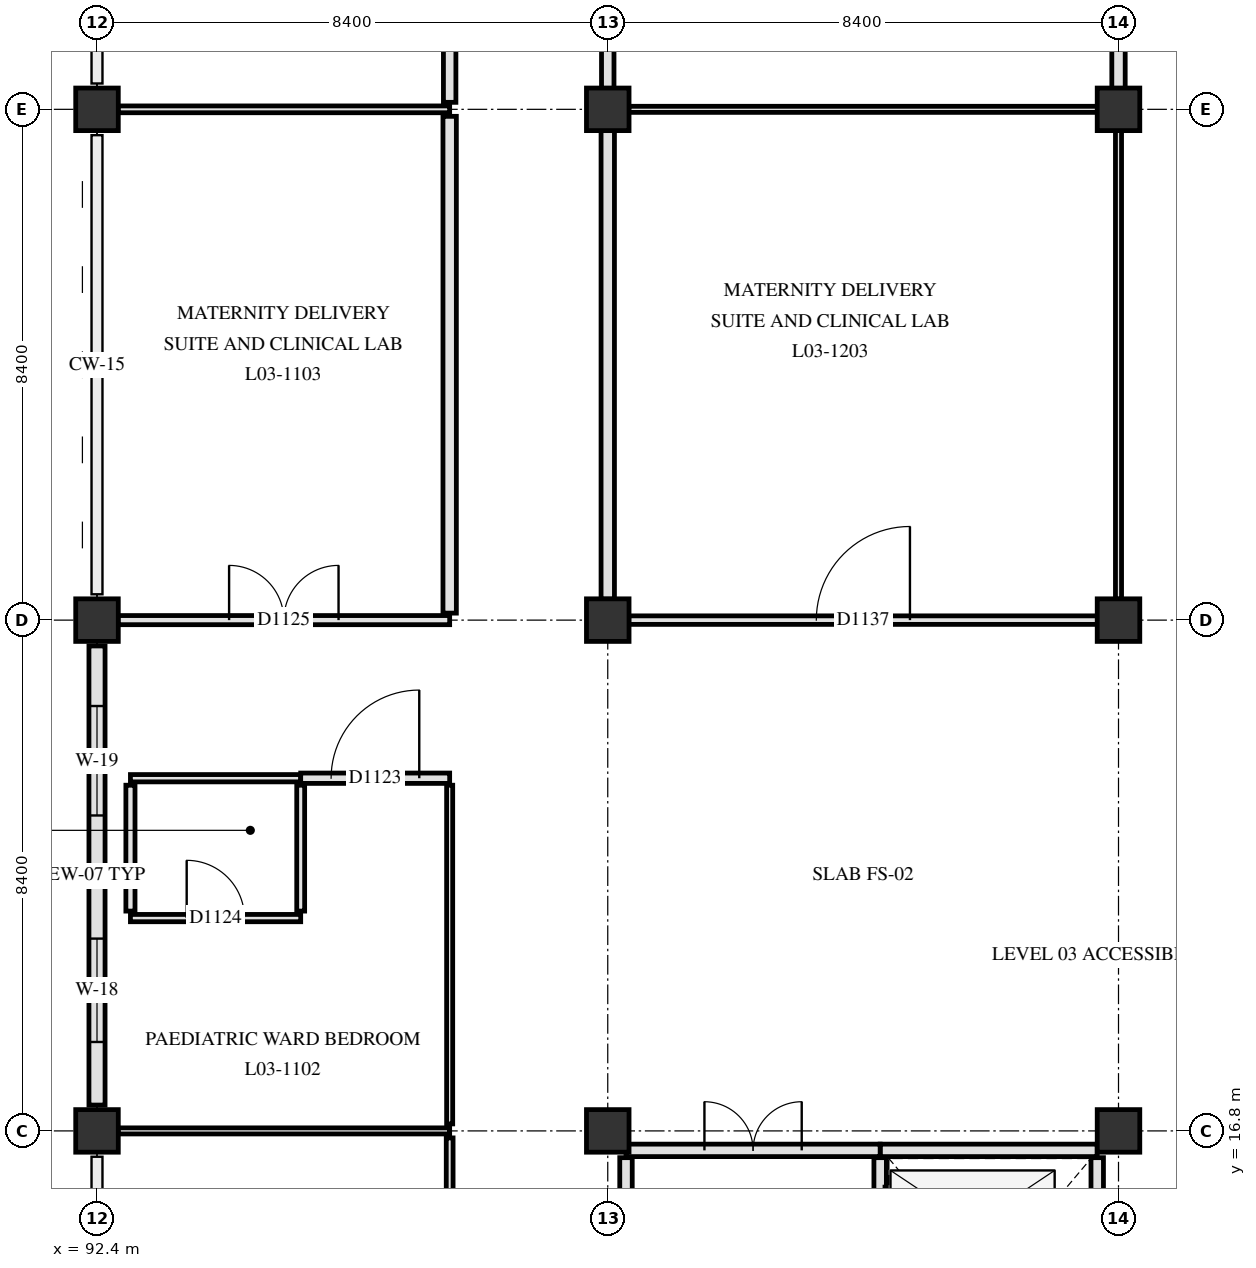
"""IFC4 building model, lengths in metres.
Left out: names, types, materials, properties, quantities, classifications, styles, units other than length and angle.
Written with IfcOpenShell. Run it as: python <this file> out.ifc"""

import sys

from ifc_helpers import new_model, si_unit, direction, frame, frame_2d, origin, origin_2d, place, context, subcontext, project, spatial, rectangle, extrude, element, fill, save


model = new_model("IFC4")
c1 = context("Model", 3, precision=1e-05, world=origin(), true_north=direction((0.0, 1.0)))
c2 = subcontext(c1, "Body", "Model", "MODEL_VIEW")
j1 = project(units=[si_unit("LENGTHUNIT", "METRE"), si_unit("PLANEANGLEUNIT", "RADIAN")], contexts=[c1])
p1 = place(None, origin())
s1 = spatial("IfcSite", under=j1, at=p1, CompositionType="ELEMENT")
p2 = place(p1, origin())
s2 = spatial("IfcBuilding", under=s1, at=p2, CompositionType="ELEMENT")
p3 = place(p2, frame((0.0, 0.0, 14.4)))
s3 = spatial("IfcBuildingStorey", under=s2, at=p3, CompositionType="ELEMENT", Elevation=14.4)
for number, where, z_axis, x_axis in (
    (1, (92.4, 16.8, 0.0), (0.0, 0.0, 1.0), (1.0, 0.0, 0.0)),
    (2, (92.4, 25.2, 0.0), (0.0, 0.0, 1.0), (1.0, 0.0, 0.0)),
    (3, (92.4, 33.6, 0.0), (0.0, 0.0, 1.0), (1.0, 0.0, 0.0)),
    (4, (100.8, 16.8, 0.0), (0.0, 0.0, 1.0), (1.0, 0.0, 0.0)),
    (5, (100.8, 25.2, 0.0), (0.0, 0.0, 1.0), (1.0, 0.0, 0.0)),
    (6, (100.8, 33.6, 0.0), (0.0, 0.0, 1.0), (1.0, 0.0, 0.0)),
    (7, (109.2, 16.8, 0.0), (0.0, 0.0, 1.0), (1.0, 0.0, 0.0)),
    (8, (109.2, 25.2, 0.0), (0.0, 0.0, 1.0), (1.0, 0.0, 0.0)),
    (9, (109.2, 33.6, 0.0), (0.0, 0.0, 1.0), (1.0, 0.0, 0.0)),
):
    element("IfcColumn", number, at=place(p3, frame(where, z_axis=z_axis, x_axis=x_axis)), inside=s3, PredefinedType="COLUMN", context=c2, shape_type="SweptSolid", body=[
        extrude(rectangle(XDim=0.7, YDim=0.7, at=origin_2d()), origin(), (0.0, 0.0, 1.0), 4.2),
    ])
p4 = place(p3, frame((92.4, 17.225, 0.0), z_axis=(0.0, 0.0, 1.0), x_axis=(0.0, 1.0, 0.0)))
e10 = element("IfcWall", 10, at=p4, inside=s3, PredefinedType="SOLIDWALL", context=c2, shape_type="SweptSolid", body=[
    extrude(rectangle(XDim=7.55, YDim=0.265, at=frame_2d((3.775, 0.0))), origin(), (0.0, 0.0, 1.0), 3.19),
])
p5 = place(p4, frame((1.038, 0.0, 0.85)))
e11 = element("IfcOpeningElement", 11, at=p5, cuts=e10, PredefinedType="OPENING", context=c2, shape_type="SweptSolid", body=[
    extrude(rectangle(XDim=1.7, YDim=1.42, at=frame_2d((0.85, 0.71))), frame((0.0, 0.142, 0.0), z_axis=(0.0, -1.0, 0.0), x_axis=(1.0, 0.0, 0.0)), (0.0, 0.0, 1.0), 0.285),
])
p6 = place(p4, frame((4.762, 0.0, 0.85)))
e12 = element("IfcOpeningElement", 12, at=p6, cuts=e10, PredefinedType="OPENING", context=c2, shape_type="SweptSolid", body=[
    extrude(rectangle(XDim=1.8, YDim=1.42, at=frame_2d((0.9, 0.71))), frame((0.0, 0.142, 0.0), z_axis=(0.0, -1.0, 0.0), x_axis=(1.0, 0.0, 0.0)), (0.0, 0.0, 1.0), 0.285),
])
p7 = place(p3, frame((105.28, 12.24, 0.0), z_axis=(0.0, 0.0, 1.0), x_axis=(0.0, 1.0, 0.0)))
e13 = element("IfcWall", 13, at=p7, inside=s3, PredefinedType="PARTITIONING", context=c2, shape_type="SweptSolid", body=[
    extrude(rectangle(XDim=4.12, YDim=0.205, at=frame_2d((2.06, 0.0))), origin(), (0.0, 0.0, 1.0), 3.89),
])
p8 = place(p7, frame((0.445, 0.0, 0.0)))
e14 = element("IfcOpeningElement", 14, at=p8, cuts=e13, PredefinedType="OPENING", context=c2, shape_type="SweptSolid", body=[
    extrude(rectangle(XDim=1.35, YDim=2.2, at=frame_2d((0.675, 1.1))), frame((0.0, 0.113, 0.0), z_axis=(0.0, -1.0, 0.0), x_axis=(1.0, 0.0, 0.0)), (0.0, 0.0, 1.0), 0.225),
])
p9 = place(p7, frame((2.325, 0.0, 0.0)))
e15 = element("IfcOpeningElement", 15, at=p9, cuts=e13, PredefinedType="OPENING", context=c2, shape_type="SweptSolid", body=[
    extrude(rectangle(XDim=1.35, YDim=2.2, at=frame_2d((0.675, 1.1))), frame((0.0, 0.113, 0.0), z_axis=(0.0, -1.0, 0.0), x_axis=(1.0, 0.0, 0.0)), (0.0, 0.0, 1.0), 0.225),
])
p10 = place(p3, frame((108.85, 12.24, 0.0), z_axis=(0.0, 0.0, 1.0), x_axis=(0.0, 1.0, 0.0)))
e16 = element("IfcWall", 16, at=p10, inside=s3, PredefinedType="PARTITIONING", context=c2, shape_type="SweptSolid", body=[
    extrude(rectangle(XDim=4.12, YDim=0.205, at=frame_2d((2.06, 0.0))), origin(), (0.0, 0.0, 1.0), 3.89),
])
p11 = place(p3, frame((105.28, 16.48, 0.0), z_axis=(0.0, 0.0, 1.0), x_axis=(1.0, 0.0, 0.0)))
e17 = element("IfcWall", 17, at=p11, inside=s3, PredefinedType="PARTITIONING", context=c2, shape_type="SweptSolid", body=[
    extrude(rectangle(XDim=3.57, YDim=0.205, at=frame_2d((1.785, 0.0))), origin(), (0.0, 0.0, 1.0), 3.29),
])
p12 = place(p3, frame((101.1, 12.24, 0.0), z_axis=(0.0, 0.0, 1.0), x_axis=(0.0, 1.0, 0.0)))
e18 = element("IfcWall", 18, at=p12, inside=s3, PredefinedType="PARTITIONING", context=c2, shape_type="SweptSolid", body=[
    extrude(rectangle(XDim=4.12, YDim=0.205, at=frame_2d((2.06, 0.0))), origin(), (0.0, 0.0, 1.0), 2.69),
])
p13 = place(p3, frame((101.1, 16.48, 0.0), z_axis=(0.0, 0.0, 1.0), x_axis=(1.0, 0.0, 0.0)))
e19 = element("IfcWall", 19, at=p13, inside=s3, PredefinedType="PARTITIONING", context=c2, shape_type="SweptSolid", body=[
    extrude(rectangle(XDim=4.18, YDim=0.205, at=frame_2d((2.09, 0.0))), origin(), (0.0, 0.0, 1.0), 2.69),
])
p14 = place(p13, frame((1.29, 0.0, 0.0)))
e20 = element("IfcOpeningElement", 20, at=p14, cuts=e19, PredefinedType="OPENING", context=c2, shape_type="SweptSolid", body=[
    extrude(rectangle(XDim=1.6, YDim=2.25, at=frame_2d((0.8, 1.125))), frame((0.0, 0.113, 0.0), z_axis=(0.0, -1.0, 0.0), x_axis=(1.0, 0.0, 0.0)), (0.0, 0.0, 1.0), 0.225),
])
p15 = place(p3, frame((92.745, 16.8, 0.0), z_axis=(0.0, 0.0, 1.0), x_axis=(1.0, 0.0, 0.0)))
e21 = element("IfcWall", 21, at=p15, inside=s3, PredefinedType="PARTITIONING", context=c2, shape_type="SweptSolid", body=[
    extrude(rectangle(XDim=5.455, YDim=0.1, at=frame_2d((2.728, 0.0))), origin(), (0.0, 0.0, 1.0), 3.29),
])
p16 = place(p3, frame((92.95, 20.3, 0.0), z_axis=(0.0, 0.0, 1.0), x_axis=(1.0, 0.0, 0.0)))
e22 = element("IfcWall", 22, at=p16, inside=s3, PredefinedType="PARTITIONING", context=c2, shape_type="SweptSolid", body=[
    extrude(rectangle(XDim=2.8, YDim=0.12, at=frame_2d((1.4, 0.0))), origin(), (0.0, 0.0, 1.0), 3.89),
])
p17 = place(p16, frame((0.925, 0.0, 0.0)))
e23 = element("IfcOpeningElement", 23, at=p17, cuts=e22, PredefinedType="OPENING", context=c2, shape_type="SweptSolid", body=[
    extrude(rectangle(XDim=0.95, YDim=2.1, at=frame_2d((0.475, 1.05))), frame((0.0, 0.07, 0.0), z_axis=(0.0, -1.0, 0.0), x_axis=(1.0, 0.0, 0.0)), (0.0, 0.0, 1.0), 0.14),
])
p18 = place(p3, frame((92.95, 22.6, 0.0), z_axis=(0.0, 0.0, 1.0), x_axis=(1.0, 0.0, 0.0)))
e24 = element("IfcWall", 24, at=p18, inside=s3, PredefinedType="PARTITIONING", context=c2, shape_type="SweptSolid", body=[
    extrude(rectangle(XDim=2.8, YDim=0.12, at=frame_2d((1.4, 0.0))), origin(), (0.0, 0.0, 1.0), 3.89),
])
p19 = place(p3, frame((95.75, 22.6, 0.0), z_axis=(0.0, 0.0, 1.0), x_axis=(1.0, 0.0, 0.0)))
e25 = element("IfcWall", 25, at=p19, inside=s3, PredefinedType="PARTITIONING", context=c2, shape_type="SweptSolid", body=[
    extrude(rectangle(XDim=2.45, YDim=0.17, at=frame_2d((1.225, 0.0))), origin(), (0.0, 0.0, 1.0), 3.89),
])
p20 = place(p19, frame((0.5, 0.0, 0.0)))
e26 = element("IfcOpeningElement", 26, at=p20, cuts=e25, PredefinedType="OPENING", context=c2, shape_type="SweptSolid", body=[
    extrude(rectangle(XDim=1.45, YDim=2.2, at=frame_2d((0.725, 1.1))), frame((0.0, 0.095, 0.0), z_axis=(0.0, -1.0, 0.0), x_axis=(1.0, 0.0, 0.0)), (0.0, 0.0, 1.0), 0.19),
])
p21 = place(p3, frame((92.745, 25.2, 0.0), z_axis=(0.0, 0.0, 1.0), x_axis=(1.0, 0.0, 0.0)))
e27 = element("IfcWall", 27, at=p21, inside=s3, PredefinedType="PARTITIONING", context=c2, shape_type="SweptSolid", body=[
    extrude(rectangle(XDim=5.455, YDim=0.15, at=frame_2d((2.728, 0.0))), origin(), (0.0, 0.0, 1.0), 2.89),
])
p22 = place(p21, frame((1.827, 0.0, 0.0)))
e28 = element("IfcOpeningElement", 28, at=p22, cuts=e27, PredefinedType="OPENING", context=c2, shape_type="SweptSolid", body=[
    extrude(rectangle(XDim=1.8, YDim=2.25, at=frame_2d((0.9, 1.125))), frame((0.0, 0.085, 0.0), z_axis=(0.0, -1.0, 0.0), x_axis=(1.0, 0.0, 0.0)), (0.0, 0.0, 1.0), 0.17),
])
p23 = place(p3, frame((101.145, 25.2, 0.0), z_axis=(0.0, 0.0, 1.0), x_axis=(1.0, 0.0, 0.0)))
e29 = element("IfcWall", 29, at=p23, inside=s3, PredefinedType="PARTITIONING", context=c2, shape_type="SweptSolid", body=[
    extrude(rectangle(XDim=7.71, YDim=0.14, at=frame_2d((3.855, 0.0))), origin(), (0.0, 0.0, 1.0), 2.89),
])
p24 = place(p23, frame((3.085, 0.0, 0.0)))
e30 = element("IfcOpeningElement", 30, at=p24, cuts=e29, PredefinedType="OPENING", context=c2, shape_type="SweptSolid", body=[
    extrude(rectangle(XDim=1.54, YDim=2.24, at=frame_2d((0.77, 1.12))), frame((0.0, 0.08, 0.0), z_axis=(0.0, -1.0, 0.0), x_axis=(1.0, 0.0, 0.0)), (0.0, 0.0, 1.0), 0.16),
])
p25 = place(p3, frame((92.745, 33.6, 0.0), z_axis=(0.0, 0.0, 1.0), x_axis=(1.0, 0.0, 0.0)))
e31 = element("IfcWall", 31, at=p25, inside=s3, PredefinedType="PARTITIONING", context=c2, shape_type="SweptSolid", body=[
    extrude(rectangle(XDim=5.455, YDim=0.112, at=frame_2d((2.728, 0.0))), origin(), (0.0, 0.0, 1.0), 3.29),
])
p26 = place(p3, frame((101.145, 33.6, 0.0), z_axis=(0.0, 0.0, 1.0), x_axis=(1.0, 0.0, 0.0)))
e32 = element("IfcWall", 32, at=p26, inside=s3, PredefinedType="PARTITIONING", context=c2, shape_type="SweptSolid", body=[
    extrude(rectangle(XDim=7.71, YDim=0.1, at=frame_2d((3.855, 0.0))), origin(), (0.0, 0.0, 1.0), 3.29),
])
p27 = place(p3, frame((92.95, 20.415, 0.0), z_axis=(0.0, 0.0, 1.0), x_axis=(0.0, 1.0, 0.0)))
e33 = element("IfcWall", 33, at=p27, inside=s3, PredefinedType="PARTITIONING", context=c2, shape_type="SweptSolid", body=[
    extrude(rectangle(XDim=2.07, YDim=0.15, at=frame_2d((1.035, 0.0))), origin(), (0.0, 0.0, 1.0), 3.89),
])
p28 = place(p3, frame((95.75, 20.415, 0.0), z_axis=(0.0, 0.0, 1.0), x_axis=(0.0, 1.0, 0.0)))
e34 = element("IfcWall", 34, at=p28, inside=s3, PredefinedType="PARTITIONING", context=c2, shape_type="SweptSolid", body=[
    extrude(rectangle(XDim=2.07, YDim=0.13, at=frame_2d((1.035, 0.0))), origin(), (0.0, 0.0, 1.0), 3.89),
])
p29 = place(p3, frame((98.2, 11.115, 0.0), z_axis=(0.0, 0.0, 1.0), x_axis=(0.0, 1.0, 0.0)))
e35 = element("IfcWall", 35, at=p29, inside=s3, PredefinedType="PARTITIONING", context=c2, shape_type="SweptSolid", body=[
    extrude(rectangle(XDim=5.57, YDim=0.112, at=frame_2d((2.785, 0.0))), origin(), (0.0, 0.0, 1.0), 3.29),
])
p30 = place(p3, frame((98.2, 16.915, 0.0), z_axis=(0.0, 0.0, 1.0), x_axis=(0.0, 1.0, 0.0)))
e36 = element("IfcWall", 36, at=p30, inside=s3, PredefinedType="PARTITIONING", context=c2, shape_type="SweptSolid", body=[
    extrude(rectangle(XDim=5.57, YDim=0.1, at=frame_2d((2.785, 0.0))), origin(), (0.0, 0.0, 1.0), 3.29),
])
p31 = place(p3, frame((98.2, 25.315, 0.0), z_axis=(0.0, 0.0, 1.0), x_axis=(0.0, 1.0, 0.0)))
e37 = element("IfcWall", 37, at=p31, inside=s3, PredefinedType="PARTITIONING", context=c2, shape_type="SweptSolid", body=[
    extrude(rectangle(XDim=8.17, YDim=0.22, at=frame_2d((4.085, 0.0))), origin(), (0.0, 0.0, 1.0), 2.89),
])
p32 = place(p3, frame((98.2, 33.715, 0.0), z_axis=(0.0, 0.0, 1.0), x_axis=(0.0, 1.0, 0.0)))
e38 = element("IfcWall", 38, at=p32, inside=s3, PredefinedType="PARTITIONING", context=c2, shape_type="SweptSolid", body=[
    extrude(rectangle(XDim=8.17, YDim=0.205, at=frame_2d((4.085, 0.0))), origin(), (0.0, 0.0, 1.0), 3.29),
])
p33 = place(p3, frame((100.8, 25.545, 0.0), z_axis=(0.0, 0.0, 1.0), x_axis=(0.0, 1.0, 0.0)))
e39 = element("IfcWall", 39, at=p33, inside=s3, PredefinedType="PARTITIONING", context=c2, shape_type="SweptSolid", body=[
    extrude(rectangle(XDim=7.71, YDim=0.22, at=frame_2d((3.855, 0.0))), origin(), (0.0, 0.0, 1.0), 2.69),
])
p34 = place(p3, frame((100.8, 33.945, 0.0), z_axis=(0.0, 0.0, 1.0), x_axis=(0.0, 1.0, 0.0)))
e40 = element("IfcWall", 40, at=p34, inside=s3, PredefinedType="PARTITIONING", context=c2, shape_type="SweptSolid", body=[
    extrude(rectangle(XDim=7.71, YDim=0.205, at=frame_2d((3.855, 0.0))), origin(), (0.0, 0.0, 1.0), 2.69),
])
p35 = place(p3, frame((109.2, 25.545, 0.0), z_axis=(0.0, 0.0, 1.0), x_axis=(0.0, 1.0, 0.0)))
e41 = element("IfcWall", 41, at=p35, inside=s3, PredefinedType="PARTITIONING", context=c2, shape_type="SweptSolid", body=[
    extrude(rectangle(XDim=7.71, YDim=0.1, at=frame_2d((3.855, 0.0))), origin(), (0.0, 0.0, 1.0), 3.34),
])
p36 = place(p3, frame((109.2, 33.945, 0.0), z_axis=(0.0, 0.0, 1.0), x_axis=(0.0, 1.0, 0.0)))
e42 = element("IfcWall", 42, at=p36, inside=s3, PredefinedType="PARTITIONING", context=c2, shape_type="SweptSolid", body=[
    extrude(rectangle(XDim=7.71, YDim=0.22, at=frame_2d((3.855, 0.0))), origin(), (0.0, 0.0, 1.0), 3.34),
])
p37 = place(p5, origin())
e43 = element("IfcWindow", 43, at=p37, inside=s3, PartitioningType="SINGLE_PANEL", PredefinedType="WINDOW", context=c2, shape_type="SweptSolid", body=[
    extrude(rectangle(XDim=1.7, YDim=1.42, at=frame_2d((0.85, 0.71))), frame((0.0, 0.03, 0.0), z_axis=(0.0, -1.0, 0.0), x_axis=(1.0, 0.0, 0.0)), (0.0, 0.0, 1.0), 0.06),
])
fill(e11, e43)
p38 = place(p6, origin())
e44 = element("IfcWindow", 44, at=p38, inside=s3, PartitioningType="SINGLE_PANEL", PredefinedType="WINDOW", context=c2, shape_type="SweptSolid", body=[
    extrude(rectangle(XDim=1.8, YDim=1.42, at=frame_2d((0.9, 0.71))), frame((0.0, 0.03, 0.0), z_axis=(0.0, -1.0, 0.0), x_axis=(1.0, 0.0, 0.0)), (0.0, 0.0, 1.0), 0.06),
])
fill(e12, e44)
p39 = place(p9, origin())
e45 = element("IfcDoor", 45, at=p39, inside=s3, OperationType="SLIDING_TO_LEFT", PredefinedType="DOOR", context=c2, shape_type="SweptSolid", body=[
    extrude(rectangle(XDim=1.35, YDim=2.2, at=frame_2d((0.675, 1.1))), frame((0.0, 0.025, 0.0), z_axis=(0.0, -1.0, 0.0), x_axis=(1.0, 0.0, 0.0)), (0.0, 0.0, 1.0), 0.05),
])
fill(e15, e45)
p40 = place(p14, origin())
e46 = element("IfcDoor", 46, at=p40, inside=s3, OperationType="DOUBLE_SWING_LEFT", PredefinedType="DOOR", context=c2, shape_type="SweptSolid", body=[
    extrude(rectangle(XDim=1.6, YDim=2.25, at=frame_2d((0.8, 1.125))), frame((0.0, 0.025, 0.0), z_axis=(0.0, -1.0, 0.0), x_axis=(1.0, 0.0, 0.0)), (0.0, 0.0, 1.0), 0.05),
])
fill(e20, e46)
p41 = place(p20, origin())
e47 = element("IfcDoor", 47, at=p41, inside=s3, OperationType="SINGLE_SWING_RIGHT", PredefinedType="DOOR", context=c2, shape_type="SweptSolid", body=[
    extrude(rectangle(XDim=1.45, YDim=2.2, at=frame_2d((0.725, 1.1))), frame((0.0, 0.025, 0.0), z_axis=(0.0, -1.0, 0.0), x_axis=(1.0, 0.0, 0.0)), (0.0, 0.0, 1.0), 0.05),
])
fill(e26, e47)
p42 = place(p17, origin())
e48 = element("IfcDoor", 48, at=p42, inside=s3, OperationType="SINGLE_SWING_LEFT", PredefinedType="DOOR", context=c2, shape_type="SweptSolid", body=[
    extrude(rectangle(XDim=0.95, YDim=2.1, at=frame_2d((0.475, 1.05))), frame((0.0, 0.025, 0.0), z_axis=(0.0, -1.0, 0.0), x_axis=(1.0, 0.0, 0.0)), (0.0, 0.0, 1.0), 0.05),
])
fill(e23, e48)
p43 = place(p22, origin())
e49 = element("IfcDoor", 49, at=p43, inside=s3, OperationType="DOUBLE_SWING_RIGHT", PredefinedType="DOOR", context=c2, shape_type="SweptSolid", body=[
    extrude(rectangle(XDim=1.8, YDim=2.25, at=frame_2d((0.9, 1.125))), frame((0.0, 0.025, 0.0), z_axis=(0.0, -1.0, 0.0), x_axis=(1.0, 0.0, 0.0)), (0.0, 0.0, 1.0), 0.05),
])
fill(e28, e49)
p44 = place(p24, origin())
e50 = element("IfcDoor", 50, at=p44, inside=s3, OperationType="SINGLE_SWING_RIGHT", PredefinedType="DOOR", context=c2, shape_type="SweptSolid", body=[
    extrude(rectangle(XDim=1.54, YDim=2.24, at=frame_2d((0.77, 1.12))), frame((0.0, 0.025, 0.0), z_axis=(0.0, -1.0, 0.0), x_axis=(1.0, 0.0, 0.0)), (0.0, 0.0, 1.0), 0.05),
])
fill(e30, e50)
save(model, sys.argv[1])
